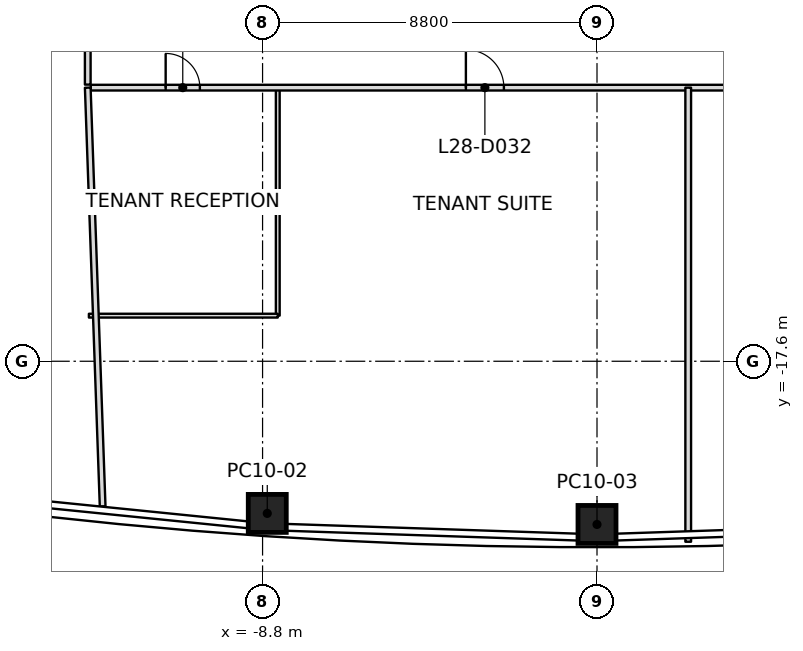
"""IFC4 building model, lengths in metres.
Left out: names, types, materials, properties, quantities, classifications, styles, units other than length and angle.
Written with IfcOpenShell. Run it as: python <this file> out.ifc"""

import sys

from ifc_helpers import new_model, si_unit, direction, frame, frame_2d, origin, origin_2d, place, context, subcontext, project, spatial, rectangle, extrude, element, fill, save


model = new_model("IFC4")
c1 = context("Model", 3, precision=1e-05, world=origin(), true_north=direction((0.0, 1.0)))
c2 = subcontext(c1, "Body", "Model", "MODEL_VIEW")
j1 = project(units=[si_unit("LENGTHUNIT", "METRE"), si_unit("PLANEANGLEUNIT", "RADIAN")], contexts=[c1])
p1 = place(None, origin())
s1 = spatial("IfcSite", under=j1, at=p1, CompositionType="ELEMENT")
p2 = place(p1, origin())
s2 = spatial("IfcBuilding", under=s1, at=p2, CompositionType="ELEMENT")
p3 = place(p2, frame((0.0, 0.0, 133.8)))
s3 = spatial("IfcBuildingStorey", under=s2, at=p3, CompositionType="ELEMENT", Elevation=133.8)
p4 = place(p3, frame((-8.677, -21.604, 0.0), z_axis=(0.008849193104, 0.011229320904, 0.999897791843), x_axis=(-0.99771962889, 0.067009688007, 0.008077365942)))
e1 = element("IfcColumn", 1, at=p4, inside=s3, PredefinedType="COLUMN", context=c2, shape_type="SweptSolid", body=[
    extrude(rectangle(XDim=1.0, YDim=1.0, at=origin_2d()), origin(), (0.0, 0.0, 1.0), 4.0),
])
p5 = place(p3, frame((0.0, -21.894, 0.0), z_axis=(0.0, 0.01141283087, 0.999934871525), x_axis=(1.0, 0.0, 0.0)))
e2 = element("IfcColumn", 2, at=p5, inside=s3, PredefinedType="COLUMN", context=c2, shape_type="SweptSolid", body=[
    extrude(rectangle(XDim=1.0, YDim=1.0, at=origin_2d()), origin(), (0.0, 0.0, 1.0), 4.0),
])
p6 = place(p3, frame((-13.4, -10.4, 0.0), z_axis=(0.0, 0.0, 1.0), x_axis=(0.035539097782, -0.999368286734, 0.0)))
e3 = element("IfcWall", 3, at=p6, inside=s3, PredefinedType="PARTITIONING", context=c2, shape_type="SweptSolid", body=[
    extrude(rectangle(XDim=11.026, YDim=0.15, at=frame_2d((5.513, 0.0))), origin(), (0.0, 0.0, 1.0), 3.234),
])
p7 = place(p3, frame((2.4, -10.4, 0.0), z_axis=(0.0, 0.0, 1.0), x_axis=(0.0, -1.0, 0.0)))
e4 = element("IfcWall", 4, at=p7, inside=s3, PredefinedType="PARTITIONING", context=c2, shape_type="SweptSolid", body=[
    extrude(rectangle(XDim=11.949, YDim=0.15, at=frame_2d((5.975, 0.0))), origin(), (0.0, 0.0, 1.0), 3.234),
])
p8 = place(p3, frame((-13.4, 10.32, 0.0), z_axis=(0.0, 0.0, 1.0), x_axis=(0.0, -1.0, 0.0)))
e5 = element("IfcWall", 5, at=p8, inside=s3, PredefinedType="PARTITIONING", context=c2, shape_type="SweptSolid", body=[
    extrude(rectangle(XDim=20.64, YDim=0.15, at=frame_2d((10.32, 0.0))), origin(), (0.0, 0.0, 1.0), 3.166),
])
p9 = place(p8, frame((4.32, 0.0, 0.0)))
e6 = element("IfcOpeningElement", 6, at=p9, cuts=e5, PredefinedType="OPENING", context=c2, shape_type="SweptSolid", body=[
    extrude(rectangle(XDim=1.0, YDim=2.1, at=frame_2d((0.5, 1.05))), frame((0.0, 0.075, 0.0), z_axis=(0.0, -1.0, 0.0), x_axis=(1.0, 0.0, 0.0)), (0.0, 0.0, 1.0), 0.15),
])
p10 = place(p8, frame((10.77, 0.0, 0.0)))
e7 = element("IfcOpeningElement", 7, at=p10, cuts=e5, PredefinedType="OPENING", context=c2, shape_type="SweptSolid", body=[
    extrude(rectangle(XDim=0.9, YDim=2.1, at=frame_2d((0.45, 1.05))), frame((0.0, 0.075, 0.0), z_axis=(0.0, -1.0, 0.0), x_axis=(1.0, 0.0, 0.0)), (0.0, 0.0, 1.0), 0.15),
])
p11 = place(p8, frame((16.28, 0.0, 0.0)))
e8 = element("IfcOpeningElement", 8, at=p11, cuts=e5, PredefinedType="OPENING", context=c2, shape_type="SweptSolid", body=[
    extrude(rectangle(XDim=1.0, YDim=2.1, at=frame_2d((0.5, 1.05))), frame((0.0, 0.075, 0.0), z_axis=(0.0, -1.0, 0.0), x_axis=(1.0, 0.0, 0.0)), (0.0, 0.0, 1.0), 0.15),
])
p12 = place(p3, frame((-13.32, -10.4, 0.0), z_axis=(0.0, 0.0, 1.0), x_axis=(1.0, 0.0, 0.0)))
e9 = element("IfcWall", 9, at=p12, inside=s3, PredefinedType="PARTITIONING", context=c2, shape_type="SweptSolid", body=[
    extrude(rectangle(XDim=26.64, YDim=0.15, at=frame_2d((13.32, 0.0))), origin(), (0.0, 0.0, 1.0), 3.317),
])
p13 = place(p12, frame((1.97, 0.0, 0.0)))
e10 = element("IfcOpeningElement", 10, at=p13, cuts=e9, PredefinedType="OPENING", context=c2, shape_type="SweptSolid", body=[
    extrude(rectangle(XDim=0.9, YDim=2.1, at=frame_2d((0.45, 1.05))), frame((0.0, 0.075, 0.0), z_axis=(0.0, -1.0, 0.0), x_axis=(1.0, 0.0, 0.0)), (0.0, 0.0, 1.0), 0.15),
])
p14 = place(p12, frame((9.87, 0.0, 0.0)))
e11 = element("IfcOpeningElement", 11, at=p14, cuts=e9, PredefinedType="OPENING", context=c2, shape_type="SweptSolid", body=[
    extrude(rectangle(XDim=1.0, YDim=2.1, at=frame_2d((0.5, 1.05))), frame((0.0, 0.075, 0.0), z_axis=(0.0, -1.0, 0.0), x_axis=(1.0, 0.0, 0.0)), (0.0, 0.0, 1.0), 0.15),
])
p15 = place(p12, frame((20.72, 0.0, 0.0)))
e12 = element("IfcOpeningElement", 12, at=p15, cuts=e9, PredefinedType="OPENING", context=c2, shape_type="SweptSolid", body=[
    extrude(rectangle(XDim=1.0, YDim=2.1, at=frame_2d((0.5, 1.05))), frame((0.0, 0.075, 0.0), z_axis=(0.0, -1.0, 0.0), x_axis=(1.0, 0.0, 0.0)), (0.0, 0.0, 1.0), 0.15),
])
p16 = place(p3, frame((-8.4, -10.43, 0.0), z_axis=(0.0, 0.0, 1.0), x_axis=(0.0, -1.0, 0.0)))
e13 = element("IfcWall", 13, at=p16, inside=s3, PredefinedType="PARTITIONING", context=c2, shape_type="SweptSolid", body=[
    extrude(rectangle(XDim=5.97, YDim=0.1, at=frame_2d((2.985, 0.0))), origin(), (0.0, 0.0, 1.0), 3.45),
])
p17 = place(p3, frame((-8.4, -16.4, 0.0), z_axis=(0.0, 0.0, 1.0), x_axis=(-1.0, 0.0, 0.0)))
e14 = element("IfcWall", 14, at=p17, inside=s3, PredefinedType="PARTITIONING", context=c2, shape_type="SweptSolid", body=[
    extrude(rectangle(XDim=4.97, YDim=0.1, at=frame_2d((2.485, 0.0))), origin(), (0.0, 0.0, 1.0), 3.317),
])
p18 = place(p13, origin())
e15 = element("IfcDoor", 15, at=p18, inside=s3, OperationType="SINGLE_SWING_LEFT", PredefinedType="DOOR", context=c2, shape_type="SweptSolid", body=[
    extrude(rectangle(XDim=0.9, YDim=2.1, at=frame_2d((0.45, 1.05))), frame((0.0, 0.025, 0.0), z_axis=(0.0, -1.0, 0.0), x_axis=(1.0, 0.0, 0.0)), (0.0, 0.0, 1.0), 0.05),
])
fill(e10, e15)
p19 = place(p14, origin())
e16 = element("IfcDoor", 16, at=p19, inside=s3, OperationType="SINGLE_SWING_LEFT", PredefinedType="DOOR", context=c2, shape_type="SweptSolid", body=[
    extrude(rectangle(XDim=1.0, YDim=2.1, at=frame_2d((0.5, 1.05))), frame((0.0, 0.025, 0.0), z_axis=(0.0, -1.0, 0.0), x_axis=(1.0, 0.0, 0.0)), (0.0, 0.0, 1.0), 0.05),
])
fill(e11, e16)
save(model, sys.argv[1])
